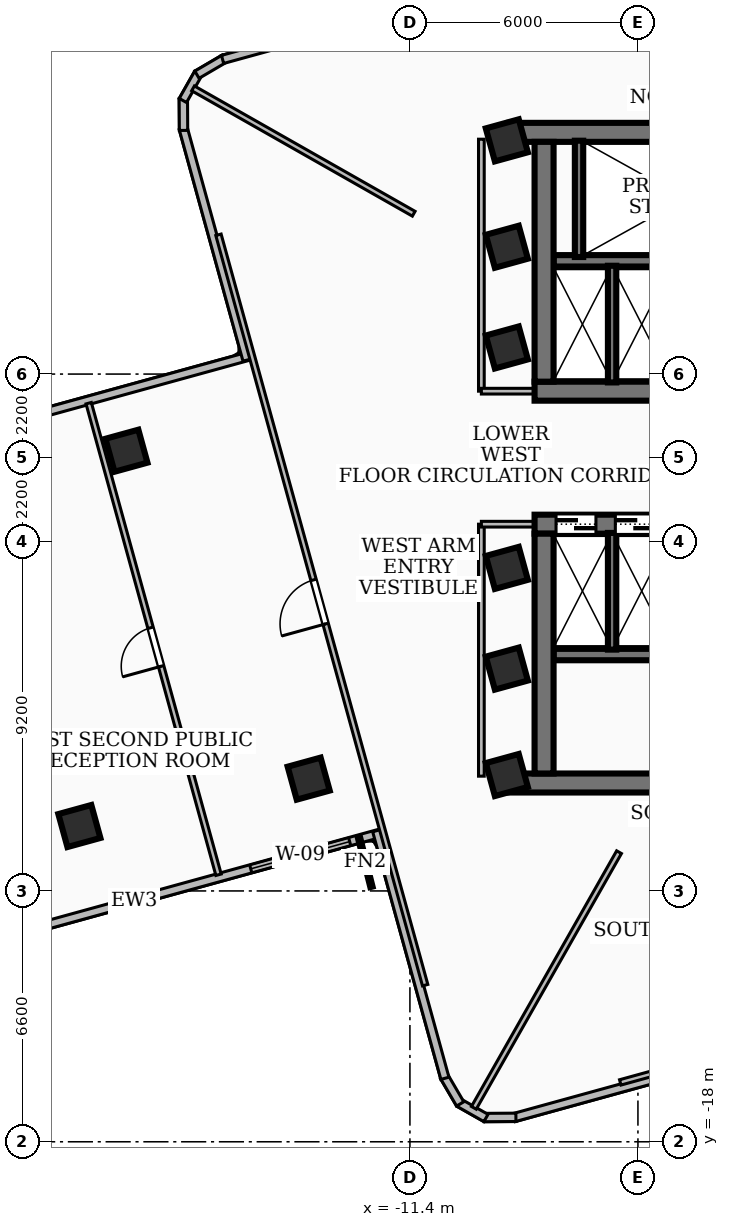
"""IFC4 building model, lengths in metres.
Left out: names, types, materials, properties, quantities, classifications, styles, units other than length and angle.
Written with IfcOpenShell. Run it as: python <this file> out.ifc"""

import sys

from ifc_helpers import new_model, si_unit, direction, frame, frame_2d, origin, origin_2d, place, context, subcontext, project, spatial, rectangle, extrude, element, fill, save


model = new_model("IFC4")
c1 = context("Model", 3, precision=1e-05, world=origin(), true_north=direction((0.0, 1.0)))
c2 = subcontext(c1, "Body", "Model", "MODEL_VIEW")
j1 = project(units=[si_unit("LENGTHUNIT", "METRE"), si_unit("PLANEANGLEUNIT", "RADIAN")], contexts=[c1])
p1 = place(None, origin())
s1 = spatial("IfcSite", under=j1, at=p1, CompositionType="ELEMENT")
p2 = place(p1, origin())
s2 = spatial("IfcBuilding", under=s1, at=p2, CompositionType="ELEMENT")
p3 = place(p2, frame((0.0, 0.0, 134.28)))
s3 = spatial("IfcBuildingStorey", under=s2, at=p3, CompositionType="ELEMENT", Elevation=134.28)
p4 = place(p3, frame((-8.78, 8.56, 0.0), z_axis=(0.0, 0.0, 1.0), x_axis=(1.0, 0.0, 0.0)))
e1 = element("IfcWall", 1, at=p4, inside=s3, PredefinedType="SHEAR", context=c2, shape_type="SweptSolid", body=[
    extrude(rectangle(XDim=17.56, YDim=0.5, at=frame_2d((8.78, 0.0))), origin(), (0.0, 0.0, 1.0), 3.32),
])
p5 = place(p3, frame((8.12, 1.75, 0.0), z_axis=(0.0, 0.0, 1.0), x_axis=(-1.0, 0.0, 0.0)))
e2 = element("IfcWall", 2, at=p5, inside=s3, PredefinedType="SHEAR", context=c2, shape_type="SweptSolid", body=[
    extrude(rectangle(XDim=16.24, YDim=0.5, at=frame_2d((8.12, 0.0))), origin(), (0.0, 0.0, 1.0), 3.32),
])
p6 = place(p5, frame((7.45, 0.0, 0.0)))
e3 = element("IfcOpeningElement", 3, at=p6, cuts=e2, PredefinedType="OPENING", context=c2, shape_type="SweptSolid", body=[
    extrude(rectangle(XDim=1.0, YDim=2.1, at=frame_2d((0.5, 1.05))), frame((0.0, 0.26, 0.0), z_axis=(0.0, -1.0, 0.0), x_axis=(1.0, 0.0, 0.0)), (0.0, 0.0, 1.0), 0.52),
])
p7 = place(p5, frame((3.4, 0.0, 0.0)))
e4 = element("IfcOpeningElement", 4, at=p7, cuts=e2, PredefinedType="OPENING", context=c2, shape_type="SweptSolid", body=[
    extrude(rectangle(XDim=0.9, YDim=2.06, at=frame_2d((0.45, 1.03))), frame((0.0, 0.26, 0.0), z_axis=(0.0, -1.0, 0.0), x_axis=(1.0, 0.0, 0.0)), (0.0, 0.0, 1.0), 0.52),
])
p8 = place(p5, frame((1.1, 0.0, 0.0)))
e5 = element("IfcOpeningElement", 5, at=p8, cuts=e2, PredefinedType="OPENING", context=c2, shape_type="SweptSolid", body=[
    extrude(rectangle(XDim=0.9, YDim=2.06, at=frame_2d((0.45, 1.03))), frame((0.0, 0.26, 0.0), z_axis=(0.0, -1.0, 0.0), x_axis=(1.0, 0.0, 0.0)), (0.0, 0.0, 1.0), 0.52),
])
p9 = place(p3, frame((-7.87, 2.0, 0.0), z_axis=(0.0, 0.0, 1.0), x_axis=(0.0, 1.0, 0.0)))
e6 = element("IfcWall", 6, at=p9, inside=s3, PredefinedType="SHEAR", context=c2, shape_type="SweptSolid", body=[
    extrude(rectangle(XDim=6.31, YDim=0.5, at=frame_2d((3.155, 0.0))), origin(), (0.0, 0.0, 1.0), 3.32),
])
p10 = place(p3, frame((7.62, 5.18, 0.0), z_axis=(0.0, 0.0, 1.0), x_axis=(-1.0, 0.0, 0.0)))
e7 = element("IfcWall", 7, at=p10, inside=s3, PredefinedType="SOLIDWALL", context=c2, shape_type="SweptSolid", body=[
    extrude(rectangle(XDim=15.24, YDim=0.3, at=frame_2d((7.62, 0.0))), origin(), (0.0, 0.0, 1.0), 3.32),
])
p11 = place(p10, frame((5.77, 0.0, 0.0)))
e8 = element("IfcOpeningElement", 8, at=p11, cuts=e7, PredefinedType="OPENING", context=c2, shape_type="SweptSolid", body=[
    extrude(rectangle(XDim=1.1, YDim=2.15, at=frame_2d((0.55, 1.075))), frame((0.0, 0.16, 0.0), z_axis=(0.0, -1.0, 0.0), x_axis=(1.0, 0.0, 0.0)), (0.0, 0.0, 1.0), 0.32),
])
p12 = place(p10, frame((2.97, 0.0, 0.0)))
e9 = element("IfcOpeningElement", 9, at=p12, cuts=e7, PredefinedType="OPENING", context=c2, shape_type="SweptSolid", body=[
    extrude(rectangle(XDim=1.1, YDim=2.15, at=frame_2d((0.55, 1.075))), frame((0.0, 0.16, 0.0), z_axis=(0.0, -1.0, 0.0), x_axis=(1.0, 0.0, 0.0)), (0.0, 0.0, 1.0), 0.32),
])
p13 = place(p10, frame((7.97, 0.0, 0.0)))
e10 = element("IfcOpeningElement", 10, at=p13, cuts=e7, PredefinedType="OPENING", context=c2, shape_type="SweptSolid", body=[
    extrude(rectangle(XDim=1.0, YDim=2.1, at=frame_2d((0.5, 1.05))), frame((0.0, 0.16, 0.0), z_axis=(0.0, -1.0, 0.0), x_axis=(1.0, 0.0, 0.0)), (0.0, 0.0, 1.0), 0.32),
])
p14 = place(p3, frame((8.78, -8.56, 0.0), z_axis=(0.0, 0.0, 1.0), x_axis=(-1.0, 0.0, 0.0)))
e11 = element("IfcWall", 11, at=p14, inside=s3, PredefinedType="SHEAR", context=c2, shape_type="SweptSolid", body=[
    extrude(rectangle(XDim=17.56, YDim=0.5, at=frame_2d((8.78, 0.0))), origin(), (0.0, 0.0, 1.0), 3.32),
])
p15 = place(p3, frame((-8.12, -1.75, 0.0), z_axis=(0.0, 0.0, 1.0), x_axis=(1.0, 0.0, 0.0)))
e12 = element("IfcWall", 12, at=p15, inside=s3, PredefinedType="SHEAR", context=c2, shape_type="SweptSolid", body=[
    extrude(rectangle(XDim=16.24, YDim=0.5, at=frame_2d((8.12, 0.0))), origin(), (0.0, 0.0, 1.0), 3.32),
])
p16 = place(p15, frame((7.45, 0.0, 0.0)))
e13 = element("IfcOpeningElement", 13, at=p16, cuts=e12, PredefinedType="OPENING", context=c2, shape_type="SweptSolid", body=[
    extrude(rectangle(XDim=1.0, YDim=2.1, at=frame_2d((0.5, 1.05))), frame((0.0, 0.26, 0.0), z_axis=(0.0, -1.0, 0.0), x_axis=(1.0, 0.0, 0.0)), (0.0, 0.0, 1.0), 0.52),
])
p17 = place(p15, frame((12.65, 0.0, 0.0)))
e14 = element("IfcOpeningElement", 14, at=p17, cuts=e12, PredefinedType="OPENING", context=c2, shape_type="SweptSolid", body=[
    extrude(rectangle(XDim=0.9, YDim=2.06, at=frame_2d((0.45, 1.03))), frame((0.0, 0.26, 0.0), z_axis=(0.0, -1.0, 0.0), x_axis=(1.0, 0.0, 0.0)), (0.0, 0.0, 1.0), 0.52),
])
p18 = place(p15, frame((0.565, 0.0, 0.0)))
e15 = element("IfcOpeningElement", 15, at=p18, cuts=e12, PredefinedType="OPENING", context=c2, shape_type="SweptSolid", body=[
    extrude(rectangle(XDim=1.05, YDim=2.15, at=frame_2d((0.525, 1.075))), frame((0.0, 0.26, 0.0), z_axis=(0.0, -1.0, 0.0), x_axis=(1.0, 0.0, 0.0)), (0.0, 0.0, 1.0), 0.52),
])
p19 = place(p15, frame((2.125, 0.0, 0.0)))
e16 = element("IfcOpeningElement", 16, at=p19, cuts=e12, PredefinedType="OPENING", context=c2, shape_type="SweptSolid", body=[
    extrude(rectangle(XDim=1.05, YDim=2.15, at=frame_2d((0.525, 1.075))), frame((0.0, 0.26, 0.0), z_axis=(0.0, -1.0, 0.0), x_axis=(1.0, 0.0, 0.0)), (0.0, 0.0, 1.0), 0.52),
])
p20 = place(p15, frame((3.685, 0.0, 0.0)))
e17 = element("IfcOpeningElement", 17, at=p20, cuts=e12, PredefinedType="OPENING", context=c2, shape_type="SweptSolid", body=[
    extrude(rectangle(XDim=1.05, YDim=2.15, at=frame_2d((0.525, 1.075))), frame((0.0, 0.26, 0.0), z_axis=(0.0, -1.0, 0.0), x_axis=(1.0, 0.0, 0.0)), (0.0, 0.0, 1.0), 0.52),
])
p21 = place(p3, frame((-7.87, -8.31, 0.0), z_axis=(0.0, 0.0, 1.0), x_axis=(0.0, 1.0, 0.0)))
e18 = element("IfcWall", 18, at=p21, inside=s3, PredefinedType="SHEAR", context=c2, shape_type="SweptSolid", body=[
    extrude(rectangle(XDim=6.31, YDim=0.5, at=frame_2d((3.155, 0.0))), origin(), (0.0, 0.0, 1.0), 3.32),
])
p22 = place(p3, frame((-7.62, -5.18, 0.0), z_axis=(0.0, 0.0, 1.0), x_axis=(1.0, 0.0, 0.0)))
e19 = element("IfcWall", 19, at=p22, inside=s3, PredefinedType="SOLIDWALL", context=c2, shape_type="SweptSolid", body=[
    extrude(rectangle(XDim=15.24, YDim=0.3, at=frame_2d((7.62, 0.0))), origin(), (0.0, 0.0, 1.0), 3.32),
])
p23 = place(p22, frame((5.77, 0.0, 0.0)))
e20 = element("IfcOpeningElement", 20, at=p23, cuts=e19, PredefinedType="OPENING", context=c2, shape_type="SweptSolid", body=[
    extrude(rectangle(XDim=1.1, YDim=2.15, at=frame_2d((0.55, 1.075))), frame((0.0, 0.16, 0.0), z_axis=(0.0, -1.0, 0.0), x_axis=(1.0, 0.0, 0.0)), (0.0, 0.0, 1.0), 0.32),
])
p24 = place(p22, frame((7.97, 0.0, 0.0)))
e21 = element("IfcOpeningElement", 21, at=p24, cuts=e19, PredefinedType="OPENING", context=c2, shape_type="SweptSolid", body=[
    extrude(rectangle(XDim=1.0, YDim=2.1, at=frame_2d((0.5, 1.05))), frame((0.0, 0.16, 0.0), z_axis=(0.0, -1.0, 0.0), x_axis=(1.0, 0.0, 0.0)), (0.0, 0.0, 1.0), 0.32),
])
p25 = place(p3, frame((-6.95, 5.28, 0.0), z_axis=(0.0, 0.0, 1.0), x_axis=(0.0, 1.0, 0.0)))
e22 = element("IfcWall", 22, at=p25, inside=s3, PredefinedType="SOLIDWALL", context=c2, shape_type="SweptSolid", body=[
    extrude(rectangle(XDim=3.06, YDim=0.22, at=frame_2d((1.53, 0.0))), origin(), (0.0, 0.0, 1.0), 3.32),
])
for number, where, z_axis, x_axis in (
    (23, (-6.08, 1.98, 0.0), (0.0, 0.0, 1.0), (0.0, 1.0, 0.0)),
    (24, (-6.08, -5.05, 0.0), (0.0, 0.0, 1.0), (0.0, 1.0, 0.0)),
):
    element("IfcWall", number, at=place(p3, frame(where, z_axis=z_axis, x_axis=x_axis)), inside=s3, PredefinedType="SOLIDWALL", context=c2, shape_type="SweptSolid", body=[
        extrude(rectangle(XDim=3.07, YDim=0.22, at=frame_2d((1.535, 0.0))), origin(), (0.0, 0.0, 1.0), 3.32),
    ])
for number, where, z_axis, x_axis in (
    (25, (-8.85, -5.55, 0.0), (0.0, 0.0, 1.0), (0.964, 0.266, 0.0)),
    (26, (-8.85, -2.9, 0.0), (0.0, 0.0, 1.0), (0.964, 0.266, 0.0)),
    (27, (-8.85, 2.9, 0.0), (0.0, 0.0, 1.0), (0.964, 0.266, 0.0)),
    (28, (-8.85, 5.55, 0.0), (0.0, 0.0, 1.0), (0.964, 0.266, 0.0)),
    (29, (-8.85, 8.35, 0.0), (0.0, 0.0, 1.0), (0.964, 0.266, 0.0)),
    (30, (-8.85, -8.35, 0.0), (0.0, 0.0, 1.0), (0.964, 0.266, 0.0)),
    (31, (-18.86, 0.183, 0.0), (0.0, 0.0, 1.0), (0.964, 0.266, 0.0)),
    (32, (-14.064, -8.445, 0.0), (0.0, 0.0, 1.0), (0.964, 0.266, 0.0)),
    (33, (-20.098, -9.692, 0.0), (0.0, 0.0, 1.0), (0.964, 0.266, 0.0)),
):
    element("IfcColumn", number, at=place(p3, frame(where, z_axis=z_axis, x_axis=x_axis)), inside=s3, PredefinedType="COLUMN", context=c2, shape_type="SweptSolid", body=[
        extrude(rectangle(XDim=0.9, YDim=0.9, at=origin_2d()), origin(), (0.0, 0.0, 1.0), 3.6),
    ])
p26 = place(p3, frame((-12.166, -9.876, 0.0), z_axis=(0.0, 0.0, 1.0), x_axis=(-0.964099811745, -0.2655401156, 0.0)))
e34 = element("IfcWall", 34, at=p26, inside=s3, PredefinedType="SOLIDWALL", context=c2, shape_type="SweptSolid", body=[
    extrude(rectangle(XDim=13.459, YDim=0.22, at=frame_2d((6.729, 0.0))), origin(), (0.0, 0.0, 1.0), 3.32),
])
p27 = place(p26, frame((0.85, 0.0, 0.85)))
e35 = element("IfcOpeningElement", 35, at=p27, cuts=e34, PredefinedType="OPENING", context=c2, shape_type="SweptSolid", body=[
    extrude(rectangle(XDim=2.7, YDim=1.65, at=frame_2d((1.35, 0.825))), frame((0.0, 0.12, 0.0), z_axis=(0.0, -1.0, 0.0), x_axis=(1.0, 0.0, 0.0)), (0.0, 0.0, 1.0), 0.24),
])
p28 = place(p3, frame((-28.599, -0.897, 0.0), z_axis=(0.0, 0.0, 1.0), x_axis=(0.964113270695, 0.265491245185, 0.0)))
e36 = element("IfcWall", 36, at=p28, inside=s3, PredefinedType="SOLIDWALL", context=c2, shape_type="SweptSolid", body=[
    extrude(rectangle(XDim=13.458, YDim=0.22, at=frame_2d((6.729, 0.0))), origin(), (0.0, 0.0, 1.0), 3.32),
])
p29 = place(p28, frame((1.1, 0.0, 0.85)))
e37 = element("IfcOpeningElement", 37, at=p29, cuts=e36, PredefinedType="OPENING", context=c2, shape_type="SweptSolid", body=[
    extrude(rectangle(XDim=2.1, YDim=2.0, at=frame_2d((1.05, 1.0))), frame((0.0, 0.12, 0.0), z_axis=(0.0, -1.0, 0.0), x_axis=(1.0, 0.0, 0.0)), (0.0, 0.0, 1.0), 0.24),
])
p30 = place(p3, frame((-15.686, 2.568, 0.0), z_axis=(0.0, 0.0, 1.0), x_axis=(-0.265558779784, 0.964094670911, 0.0)))
e38 = element("IfcWall", 38, at=p30, inside=s3, PredefinedType="SOLIDWALL", context=c2, shape_type="SweptSolid", body=[
    extrude(rectangle(XDim=6.319, YDim=0.22, at=frame_2d((3.159, 0.0))), origin(), (0.0, 0.0, 1.0), 3.32),
])
p31 = place(p3, frame((-17.357, 8.611, 0.0), z_axis=(0.0, 0.0, 1.0), x_axis=(-0.006140235123, 0.999981148579, 0.0)))
e39 = element("IfcWall", 39, at=p31, inside=s3, PredefinedType="SOLIDWALL", context=c2, shape_type="SweptSolid", body=[
    extrude(rectangle(XDim=0.835, YDim=0.22, at=frame_2d((0.417, 0.0))), origin(), (0.0, 0.0, 1.0), 3.32),
])
p32 = place(p3, frame((-17.374, 9.399, 0.0), z_axis=(0.0, 0.0, 1.0), x_axis=(0.492959963164, 0.87005199541, 0.0)))
e40 = element("IfcWall", 40, at=p32, inside=s3, PredefinedType="SOLIDWALL", context=c2, shape_type="SweptSolid", body=[
    extrude(rectangle(XDim=0.82, YDim=0.22, at=frame_2d((0.41, 0.0))), origin(), (0.0, 0.0, 1.0), 3.32),
])
p33 = place(p3, frame((-17.004, 10.077, 0.0), z_axis=(0.0, 0.0, 1.0), x_axis=(0.862662761192, 0.505779557172, 0.0)))
e41 = element("IfcWall", 41, at=p33, inside=s3, PredefinedType="SOLIDWALL", context=c2, shape_type="SweptSolid", body=[
    extrude(rectangle(XDim=0.834, YDim=0.22, at=frame_2d((0.417, 0.0))), origin(), (0.0, 0.0, 1.0), 3.32),
])
p34 = place(p3, frame((-16.33, 10.479, 0.0), z_axis=(0.0, 0.0, 1.0), x_axis=(0.964092175021, 0.265567840793, 0.0)))
e42 = element("IfcWall", 42, at=p34, inside=s3, PredefinedType="SOLIDWALL", context=c2, shape_type="SweptSolid", body=[
    extrude(rectangle(XDim=6.759, YDim=0.22, at=frame_2d((3.379, 0.0))), origin(), (0.0, 0.0, 1.0), 3.32),
])
p35 = place(p3, frame((-2.568, -15.686, 0.0), z_axis=(0.0, 0.0, 1.0), x_axis=(-0.964094670911, -0.265558779784, 0.0)))
e43 = element("IfcWall", 43, at=p35, inside=s3, PredefinedType="SOLIDWALL", context=c2, shape_type="SweptSolid", body=[
    extrude(rectangle(XDim=6.319, YDim=0.22, at=frame_2d((3.159, 0.0))), origin(), (0.0, 0.0, 1.0), 2.55),
])
p36 = place(p3, frame((-8.611, -17.357, 0.0), z_axis=(0.0, 0.0, 1.0), x_axis=(-0.999981148579, -0.006140235123, 0.0)))
e44 = element("IfcWall", 44, at=p36, inside=s3, PredefinedType="SOLIDWALL", context=c2, shape_type="SweptSolid", body=[
    extrude(rectangle(XDim=0.835, YDim=0.22, at=frame_2d((0.417, 0.0))), origin(), (0.0, 0.0, 1.0), 3.32),
])
p37 = place(p3, frame((-9.399, -17.374, 0.0), z_axis=(0.0, 0.0, 1.0), x_axis=(-0.87005199541, 0.492959963164, 0.0)))
e45 = element("IfcWall", 45, at=p37, inside=s3, PredefinedType="SOLIDWALL", context=c2, shape_type="SweptSolid", body=[
    extrude(rectangle(XDim=0.82, YDim=0.22, at=frame_2d((0.41, 0.0))), origin(), (0.0, 0.0, 1.0), 3.32),
])
p38 = place(p3, frame((-10.077, -17.004, 0.0), z_axis=(0.0, 0.0, 1.0), x_axis=(-0.505779557172, 0.862662761192, 0.0)))
e46 = element("IfcWall", 46, at=p38, inside=s3, PredefinedType="SOLIDWALL", context=c2, shape_type="SweptSolid", body=[
    extrude(rectangle(XDim=0.834, YDim=0.22, at=frame_2d((0.417, 0.0))), origin(), (0.0, 0.0, 1.0), 3.32),
])
p39 = place(p3, frame((-10.479, -16.33, 0.0), z_axis=(0.0, 0.0, 1.0), x_axis=(-0.265567840793, 0.964092175021, 0.0)))
e47 = element("IfcWall", 47, at=p39, inside=s3, PredefinedType="SOLIDWALL", context=c2, shape_type="SweptSolid", body=[
    extrude(rectangle(XDim=6.759, YDim=0.22, at=frame_2d((3.379, 0.0))), origin(), (0.0, 0.0, 1.0), 3.32),
])
p40 = place(p3, frame((-9.52, 1.75, 0.0), z_axis=(0.0, 0.0, 1.0), x_axis=(0.0, 1.0, 0.0)))
e48 = element("IfcWall", 48, at=p40, inside=s3, PredefinedType="PARTITIONING", context=c2, shape_type="SweptSolid", body=[
    extrude(rectangle(XDim=6.63, YDim=0.15, at=frame_2d((3.315, 0.0))), origin(), (0.0, 0.0, 1.0), 2.55),
])
p41 = place(p3, frame((-7.85, 1.75, 0.0), z_axis=(0.0, 0.0, 1.0), x_axis=(-1.0, 0.0, 0.0)))
e49 = element("IfcWall", 49, at=p41, inside=s3, PredefinedType="PARTITIONING", context=c2, shape_type="SweptSolid", body=[
    extrude(rectangle(XDim=1.67, YDim=0.15, at=frame_2d((0.835, 0.0))), origin(), (0.0, 0.0, 1.0), 2.55),
])
p42 = place(p3, frame((-9.52, -8.38, 0.0), z_axis=(0.0, 0.0, 1.0), x_axis=(0.0, 1.0, 0.0)))
e50 = element("IfcWall", 50, at=p42, inside=s3, PredefinedType="PARTITIONING", context=c2, shape_type="SweptSolid", body=[
    extrude(rectangle(XDim=6.63, YDim=0.15, at=frame_2d((3.315, 0.0))), origin(), (0.0, 0.0, 1.0), 2.55),
])
p43 = place(p3, frame((-7.85, -1.75, 0.0), z_axis=(0.0, 0.0, 1.0), x_axis=(-1.0, 0.0, 0.0)))
e51 = element("IfcWall", 51, at=p43, inside=s3, PredefinedType="PARTITIONING", context=c2, shape_type="SweptSolid", body=[
    extrude(rectangle(XDim=1.67, YDim=0.15, at=frame_2d((0.835, 0.0))), origin(), (0.0, 0.0, 1.0), 2.55),
])
p44 = place(p3, frame((-11.3, 6.419, 0.0), z_axis=(0.0, 0.0, 1.0), x_axis=(-0.869475469758, 0.493976120363, 0.0)))
e52 = element("IfcWall", 52, at=p44, inside=s3, PredefinedType="PARTITIONING", context=c2, shape_type="SweptSolid", body=[
    extrude(rectangle(XDim=6.679, YDim=0.145, at=frame_2d((3.339, 0.0))), origin(), (0.0, 0.0, 1.0), 3.32),
])
p45 = place(p3, frame((-5.897, -10.38, 0.0), z_axis=(0.0, 0.0, 1.0), x_axis=(-0.49389771586, -0.869520009125, 0.0)))
e53 = element("IfcWall", 53, at=p45, inside=s3, PredefinedType="PARTITIONING", context=c2, shape_type="SweptSolid", body=[
    extrude(rectangle(XDim=7.737, YDim=0.145, at=frame_2d((3.868, 0.0))), origin(), (0.0, 0.0, 1.0), 2.55),
])
p46 = place(p3, frame((-10.999, -13.879, 0.0), z_axis=(0.0, 0.0, 1.0), x_axis=(-0.26558288107, 0.964088031915, 0.0)))
e54 = element("IfcWall", 54, at=p46, inside=s3, PredefinedType="PARTITIONING", context=c2, shape_type="SweptSolid", body=[
    extrude(rectangle(XDim=20.479, YDim=0.145, at=frame_2d((10.24, 0.0))), origin(), (0.0, 0.0, 1.0), 2.55),
])
p47 = place(p46, frame((9.86, 0.0, 0.0)))
e55 = element("IfcOpeningElement", 55, at=p47, cuts=e54, PredefinedType="OPENING", context=c2, shape_type="SweptSolid", body=[
    extrude(rectangle(XDim=1.2, YDim=2.1, at=frame_2d((0.6, 1.05))), frame((0.0, 0.083, 0.0), z_axis=(0.0, -1.0, 0.0), x_axis=(1.0, 0.0, 0.0)), (0.0, 0.0, 1.0), 0.165),
])
p48 = place(p3, frame((-16.436, -10.974, 0.0), z_axis=(0.0, 0.0, 1.0), x_axis=(-0.265498602623, 0.964111244621, 0.0)))
e56 = element("IfcWall", 56, at=p48, inside=s3, PredefinedType="PARTITIONING", context=c2, shape_type="SweptSolid", body=[
    extrude(rectangle(XDim=12.87, YDim=0.145, at=frame_2d((6.435, 0.0))), origin(), (0.0, 0.0, 1.0), 2.55),
])
p49 = place(p48, frame((5.69, 0.0, 0.0)))
e57 = element("IfcOpeningElement", 57, at=p49, cuts=e56, PredefinedType="OPENING", context=c2, shape_type="SweptSolid", body=[
    extrude(rectangle(XDim=1.05, YDim=2.08, at=frame_2d((0.525, 1.04))), frame((0.0, 0.083, 0.0), z_axis=(0.0, -1.0, 0.0), x_axis=(1.0, 0.0, 0.0)), (0.0, 0.0, 1.0), 0.165),
])
p50 = place(p3, frame((13.879, -10.999, 0.0), z_axis=(0.0, 0.0, 1.0), x_axis=(-0.964088031915, -0.26558288107, 0.0)))
e58 = element("IfcWall", 58, at=p50, inside=s3, PredefinedType="PARTITIONING", context=c2, shape_type="SweptSolid", body=[
    extrude(rectangle(XDim=20.479, YDim=0.145, at=frame_2d((10.24, 0.0))), origin(), (0.0, 0.0, 1.0), 2.55),
])
p51 = place(p50, frame((9.86, 0.0, 0.0)))
e59 = element("IfcOpeningElement", 59, at=p51, cuts=e58, PredefinedType="OPENING", context=c2, shape_type="SweptSolid", body=[
    extrude(rectangle(XDim=1.2, YDim=2.1, at=frame_2d((0.6, 1.05))), frame((0.0, 0.083, 0.0), z_axis=(0.0, -1.0, 0.0), x_axis=(1.0, 0.0, 0.0)), (0.0, 0.0, 1.0), 0.165),
])
p52 = place(p27, origin())
e60 = element("IfcWindow", 60, at=p52, inside=s3, PartitioningType="SINGLE_PANEL", PredefinedType="WINDOW", context=c2, shape_type="SweptSolid", body=[
    extrude(rectangle(XDim=2.7, YDim=1.65, at=frame_2d((1.35, 0.825))), frame((0.0, 0.03, 0.0), z_axis=(0.0, -1.0, 0.0), x_axis=(1.0, 0.0, 0.0)), (0.0, 0.0, 1.0), 0.06),
])
fill(e35, e60)
p53 = place(p18, origin())
e61 = element("IfcDoor", 61, at=p53, inside=s3, OperationType="DOUBLE_DOOR_SLIDING", PredefinedType="DOOR", context=c2, shape_type="SweptSolid", body=[
    extrude(rectangle(XDim=1.05, YDim=2.15, at=frame_2d((0.525, 1.075))), frame((0.0, 0.025, 0.0), z_axis=(0.0, -1.0, 0.0), x_axis=(1.0, 0.0, 0.0)), (0.0, 0.0, 1.0), 0.05),
])
fill(e15, e61)
p54 = place(p19, origin())
e62 = element("IfcDoor", 62, at=p54, inside=s3, OperationType="DOUBLE_DOOR_SLIDING", PredefinedType="DOOR", context=c2, shape_type="SweptSolid", body=[
    extrude(rectangle(XDim=1.05, YDim=2.15, at=frame_2d((0.525, 1.075))), frame((0.0, 0.025, 0.0), z_axis=(0.0, -1.0, 0.0), x_axis=(1.0, 0.0, 0.0)), (0.0, 0.0, 1.0), 0.05),
])
fill(e16, e62)
p55 = place(p47, origin())
e63 = element("IfcDoor", 63, at=p55, inside=s3, OperationType="SINGLE_SWING_LEFT", PredefinedType="DOOR", context=c2, shape_type="SweptSolid", body=[
    extrude(rectangle(XDim=1.2, YDim=2.1, at=frame_2d((0.6, 1.05))), frame((0.0, 0.025, 0.0), z_axis=(0.0, -1.0, 0.0), x_axis=(1.0, 0.0, 0.0)), (0.0, 0.0, 1.0), 0.05),
])
fill(e55, e63)
p56 = place(p49, origin())
e64 = element("IfcDoor", 64, at=p56, inside=s3, OperationType="SINGLE_SWING_LEFT", PredefinedType="DOOR", context=c2, shape_type="SweptSolid", body=[
    extrude(rectangle(XDim=1.05, YDim=2.08, at=frame_2d((0.525, 1.04))), frame((0.0, 0.025, 0.0), z_axis=(0.0, -1.0, 0.0), x_axis=(1.0, 0.0, 0.0)), (0.0, 0.0, 1.0), 0.05),
])
fill(e57, e64)
save(model, sys.argv[1])
